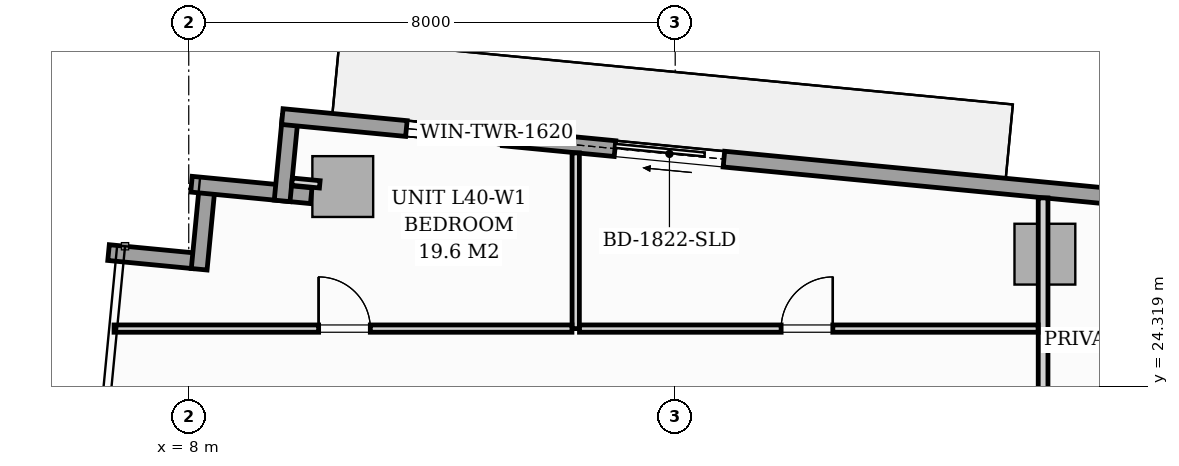
"""IFC4 building model, lengths in metres.
Left out: names, types, materials, properties, quantities, classifications, styles, units other than length and angle.
Written with IfcOpenShell. Run it as: python <this file> out.ifc"""

import sys

from ifc_helpers import new_model, si_unit, direction, frame, frame_2d, origin, origin_2d, place, context, subcontext, project, spatial, rectangle, extrude, source, transform, mapped, element, fill, save


model = new_model("IFC4")
c1 = context("Model", 3, precision=1e-05, world=origin(), true_north=direction((0.0, 1.0)))
c2 = subcontext(c1, "Body", "Model", "MODEL_VIEW")
j1 = project(units=[si_unit("LENGTHUNIT", "METRE"), si_unit("PLANEANGLEUNIT", "RADIAN")], contexts=[c1])
p1 = place(None, origin())
s1 = spatial("IfcSite", under=j1, at=p1, CompositionType="ELEMENT")
p2 = place(p1, origin())
s2 = spatial("IfcBuilding", under=s1, at=p2, CompositionType="ELEMENT")
p3 = place(p2, frame((0.0, 0.0, 140.6)))
s3 = spatial("IfcBuildingStorey", under=s2, at=p3, CompositionType="ELEMENT", Elevation=140.6)
m1 = source(origin(), c2, "Body", "SweptSolid", [
    extrude(rectangle(XDim=1.0, YDim=1.0, at=origin_2d()), origin(), (0.0, 0.0, 1.0), 3.196),
])
for number, where, z_axis, x_axis in (
    (1, (10.533, 27.604, 0.002), (0.0, 0.0, 1.0), (0.995, -0.096, 0.0)),
    (2, (22.08, 26.492, 0.002), (0.0, 0.0, 1.0), (0.995, -0.096, 0.0)),
):
    element("IfcColumn", number, at=place(p3, frame(where, z_axis=z_axis, x_axis=x_axis)), inside=s3, PredefinedType="COLUMN", context=c2, shape_type="MappedRepresentation", body=[
        mapped(m1, transform((0.0, 0.0, 0.0), scale=1.0)),
    ])
p4 = place(p3, frame((6.681, 26.518, 0.0), z_axis=(0.0, 0.0, 1.0), x_axis=(0.995389446633, -0.095915846097, 0.0)))
e3 = element("IfcWall", 3, at=p4, inside=s3, PredefinedType="STANDARD", context=c2, shape_type="SweptSolid", body=[
    extrude(rectangle(XDim=1.395, YDim=0.26, at=frame_2d((0.697, 0.0))), origin(), (0.0, 0.0, 1.0), 2.94),
])
p5 = place(p3, frame((8.172, 26.244, 0.0), z_axis=(0.0, 0.0, 1.0), x_axis=(0.095725744959, 0.99540774648, 0.0)))
e4 = element("IfcWall", 4, at=p5, inside=s3, PredefinedType="STANDARD", context=c2, shape_type="SweptSolid", body=[
    extrude(rectangle(XDim=1.395, YDim=0.26, at=frame_2d((0.698, 0.0))), origin(), (0.0, 0.0, 1.0), 2.94),
])
p6 = place(p3, frame((8.045, 27.643, 0.0), z_axis=(0.0, 0.0, 1.0), x_axis=(0.995391147587, -0.095898192396, 0.0)))
e5 = element("IfcWall", 5, at=p6, inside=s3, PredefinedType="STANDARD", context=c2, shape_type="SweptSolid", body=[
    extrude(rectangle(XDim=1.978, YDim=0.26, at=frame_2d((0.989, 0.0))), origin(), (0.0, 0.0, 1.0), 2.94),
])
p7 = place(p3, frame((9.536, 27.368, 0.0), z_axis=(0.0, 0.0, 1.0), x_axis=(0.095915846097, 0.995389446633, 0.0)))
e6 = element("IfcWall", 6, at=p7, inside=s3, PredefinedType="STANDARD", context=c2, shape_type="SweptSolid", body=[
    extrude(rectangle(XDim=1.395, YDim=0.26, at=frame_2d((0.697, 0.0))), origin(), (0.0, 0.0, 1.0), 2.94),
])
p8 = place(p3, frame((9.539, 28.754, 0.0), z_axis=(0.0, 0.0, 1.0), x_axis=(0.995397345886, -0.09583383433, 0.0)))
e7 = element("IfcWall", 7, at=p8, inside=s3, PredefinedType="STANDARD", context=c2, shape_type="SweptSolid", body=[
    extrude(rectangle(XDim=17.01, YDim=0.26, at=frame_2d((8.505, 0.0))), origin(), (0.0, 0.0, 1.0), 2.94),
])
p9 = place(p8, frame((5.496, 0.0, 0.0)))
e8 = element("IfcOpeningElement", 8, at=p9, cuts=e7, PredefinedType="OPENING", context=c2, shape_type="SweptSolid", body=[
    extrude(rectangle(XDim=1.8, YDim=2.06, at=frame_2d((0.9, 1.03))), frame((0.0, 0.14, 0.0), z_axis=(0.0, -1.0, 0.0), x_axis=(1.0, 0.0, 0.0)), (0.0, 0.0, 1.0), 0.28),
])
p10 = place(p8, frame((2.05, 0.0, 0.65)))
e9 = element("IfcOpeningElement", 9, at=p10, cuts=e7, PredefinedType="OPENING", context=c2, shape_type="SweptSolid", body=[
    extrude(rectangle(XDim=1.6, YDim=1.5, at=frame_2d((0.8, 0.75))), frame((0.0, 0.14, 0.0), z_axis=(0.0, -1.0, 0.0), x_axis=(1.0, 0.0, 0.0)), (0.0, 0.0, 1.0), 0.28),
])
p11 = place(p3, frame((22.05, 12.832, 0.0), z_axis=(0.0, 0.0, 1.0), x_axis=(0.0, 1.0, 0.0)))
e10 = element("IfcWall", 10, at=p11, inside=s3, PredefinedType="PARTITIONING", context=c2, shape_type="SweptSolid", body=[
    extrude(rectangle(XDim=14.585, YDim=0.16, at=frame_2d((7.292, 0.0))), origin(), (0.0, 0.0, 1.0), 2.94),
])
p12 = place(p11, frame((0.493, 0.0, 0.0)))
e11 = element("IfcOpeningElement", 11, at=p12, cuts=e10, PredefinedType="OPENING", context=c2, shape_type="SweptSolid", body=[
    extrude(rectangle(XDim=0.95, YDim=2.06, at=frame_2d((0.475, 1.03))), frame((0.0, 0.09, 0.0), z_axis=(0.0, -1.0, 0.0), x_axis=(1.0, 0.0, 0.0)), (0.0, 0.0, 1.0), 0.18),
])
p13 = place(p3, frame((14.364, 25.268, 0.0), z_axis=(0.0, 0.0, 1.0), x_axis=(0.0, 1.0, 0.0)))
e12 = element("IfcWall", 12, at=p13, inside=s3, PredefinedType="PARTITIONING", context=c2, shape_type="SweptSolid", body=[
    extrude(rectangle(XDim=2.889, YDim=0.12, at=frame_2d((1.445, 0.0))), origin(), (0.0, 0.0, 1.0), 2.94),
])
p14 = place(p3, frame((6.772, 25.268, 0.0), z_axis=(0.0, 0.0, 1.0), x_axis=(1.0, 0.0, 0.0)))
e13 = element("IfcWall", 13, at=p14, inside=s3, PredefinedType="PARTITIONING", context=c2, shape_type="SweptSolid", body=[
    extrude(rectangle(XDim=7.53, YDim=0.12, at=frame_2d((3.765, 0.0))), origin(), (0.0, 0.0, 1.0), 2.94),
])
p15 = place(p14, frame((3.364, 0.0, 0.0)))
e14 = element("IfcOpeningElement", 14, at=p15, cuts=e13, PredefinedType="OPENING", context=c2, shape_type="SweptSolid", body=[
    extrude(rectangle(XDim=0.85, YDim=2.05, at=frame_2d((0.425, 1.025))), frame((0.0, 0.07, 0.0), z_axis=(0.0, -1.0, 0.0), x_axis=(1.0, 0.0, 0.0)), (0.0, 0.0, 1.0), 0.14),
])
p16 = place(p3, frame((14.426, 25.268, 0.0), z_axis=(0.0, 0.0, 1.0), x_axis=(1.0, 0.0, 0.0)))
e15 = element("IfcWall", 15, at=p16, inside=s3, PredefinedType="PARTITIONING", context=c2, shape_type="SweptSolid", body=[
    extrude(rectangle(XDim=7.542, YDim=0.12, at=frame_2d((3.771, 0.0))), origin(), (0.0, 0.0, 1.0), 2.94),
])
p17 = place(p16, frame((3.316, 0.0, 0.0)))
e16 = element("IfcOpeningElement", 16, at=p17, cuts=e15, PredefinedType="OPENING", context=c2, shape_type="SweptSolid", body=[
    extrude(rectangle(XDim=0.85, YDim=2.05, at=frame_2d((0.425, 1.025))), frame((0.0, 0.07, 0.0), z_axis=(0.0, -1.0, 0.0), x_axis=(1.0, 0.0, 0.0)), (0.0, 0.0, 1.0), 0.14),
])
p18 = place(p3, frame((10.155, 27.64, 0.0), z_axis=(0.0, 0.0, 1.0), x_axis=(-0.995435366701, 0.095438098896, 0.0)))
e17 = element("IfcWall", 17, at=p18, inside=s3, PredefinedType="PARTITIONING", context=c2, shape_type="SweptSolid", body=[
    extrude(rectangle(XDim=0.458, YDim=0.12, at=frame_2d((0.229, 0.0))), origin(), (0.0, 0.0, 1.0), 2.94),
])
m2 = source(origin(), c2, "Body", "SweptSolid", [
    extrude(rectangle(XDim=1.8, YDim=2.06, at=frame_2d((0.9, 1.03))), frame((0.0, 0.025, 0.0), z_axis=(0.0, -1.0, 0.0), x_axis=(1.0, 0.0, 0.0)), (0.0, 0.0, 1.0), 0.05),
])
p19 = place(p9, origin())
e18 = element("IfcDoor", 18, at=p19, inside=s3, OperationType="SLIDING_TO_LEFT", PredefinedType="DOOR", context=c2, shape_type="MappedRepresentation", body=[
    mapped(m2, transform((0.0, 0.0, 0.0), scale=1.0)),
])
fill(e8, e18)
m3 = source(origin(), c2, "Body", "SweptSolid", [
    extrude(rectangle(XDim=1.6, YDim=1.5, at=frame_2d((0.8, 0.75))), frame((0.0, 0.03, 0.0), z_axis=(0.0, -1.0, 0.0), x_axis=(1.0, 0.0, 0.0)), (0.0, 0.0, 1.0), 0.06),
])
p20 = place(p10, origin())
e19 = element("IfcWindow", 19, at=p20, inside=s3, PartitioningType="SINGLE_PANEL", PredefinedType="WINDOW", context=c2, shape_type="MappedRepresentation", body=[
    mapped(m3, transform((0.0, 0.0, 0.0), scale=1.0)),
])
fill(e9, e19)
m4 = source(origin(), c2, "Body", "SweptSolid", [
    extrude(rectangle(XDim=0.85, YDim=2.05, at=frame_2d((0.425, 1.025))), frame((0.0, 0.025, 0.0), z_axis=(0.0, -1.0, 0.0), x_axis=(1.0, 0.0, 0.0)), (0.0, 0.0, 1.0), 0.05),
])
p21 = place(p15, origin())
e20 = element("IfcDoor", 20, at=p21, inside=s3, OperationType="SINGLE_SWING_LEFT", PredefinedType="DOOR", context=c2, shape_type="MappedRepresentation", body=[
    mapped(m4, transform((0.0, 0.0, 0.0), scale=1.0)),
])
fill(e14, e20)
p22 = place(p17, origin())
e21 = element("IfcDoor", 21, at=p22, inside=s3, OperationType="SINGLE_SWING_RIGHT", PredefinedType="DOOR", context=c2, shape_type="MappedRepresentation", body=[
    mapped(m4, transform((0.0, 0.0, 0.0), scale=1.0)),
])
fill(e16, e21)
save(model, sys.argv[1])
